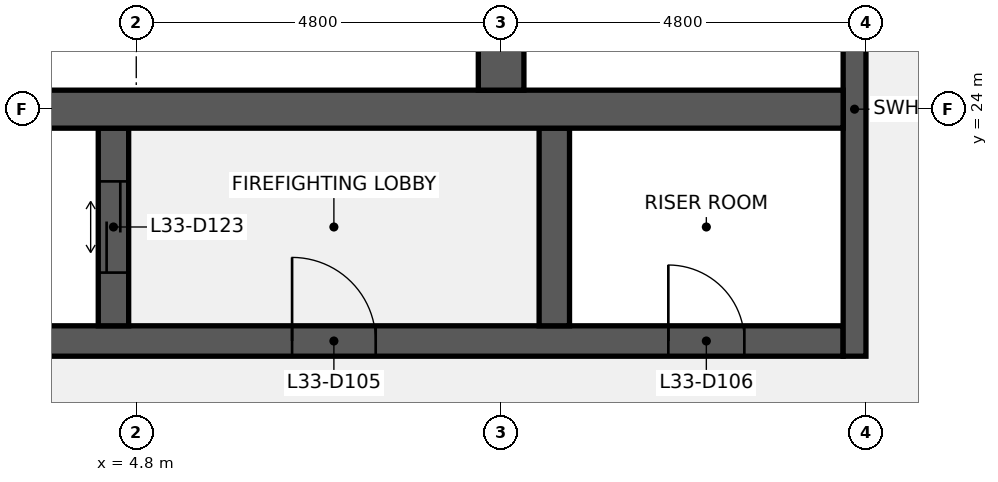
"""IFC4 building model, lengths in metres.
Left out: names, types, materials, properties, quantities, classifications, styles, units other than length and angle.
Written with IfcOpenShell. Run it as: python <this file> out.ifc"""

import sys

from ifc_helpers import new_model, si_unit, direction, frame, frame_2d, origin, place, context, subcontext, project, spatial, rectangle, extrude, element, fill, save


model = new_model("IFC4")
c1 = context("Model", 3, precision=1e-05, world=origin(), true_north=direction((0.0, 1.0)))
c2 = subcontext(c1, "Body", "Model", "MODEL_VIEW")
j1 = project(units=[si_unit("LENGTHUNIT", "METRE"), si_unit("PLANEANGLEUNIT", "RADIAN")], contexts=[c1])
p1 = place(None, origin())
s1 = spatial("IfcSite", under=j1, at=p1, CompositionType="ELEMENT")
p2 = place(p1, origin())
s2 = spatial("IfcBuilding", under=s1, at=p2, CompositionType="ELEMENT")
p3 = place(p2, frame((0.0, 0.0, 152.1)))
s3 = spatial("IfcBuildingStorey", under=s2, at=p3, CompositionType="ELEMENT", Elevation=152.1)
p4 = place(p3, frame((1.0, 20.95, 0.0), z_axis=(0.0, 0.0, 1.0), x_axis=(1.0, 0.0, 0.0)))
e1 = element("IfcWall", 1, at=p4, inside=s3, PredefinedType="SHEAR", context=c2, shape_type="SweptSolid", body=[
    extrude(rectangle(XDim=13.1, YDim=0.4, at=frame_2d((6.55, 0.0))), origin(), (0.0, 0.0, 1.0), 3.84),
])
p5 = place(p4, frame((5.85, 0.0, 0.0)))
e2 = element("IfcOpeningElement", 2, at=p5, cuts=e1, PredefinedType="OPENING", context=c2, shape_type="SweptSolid", body=[
    extrude(rectangle(XDim=1.1, YDim=2.1, at=frame_2d((0.55, 1.05))), frame((0.0, 0.21, 0.0), z_axis=(0.0, -1.0, 0.0), x_axis=(1.0, 0.0, 0.0)), (0.0, 0.0, 1.0), 0.42),
])
p6 = place(p4, frame((10.8, 0.0, 0.0)))
e3 = element("IfcOpeningElement", 3, at=p6, cuts=e1, PredefinedType="OPENING", context=c2, shape_type="SweptSolid", body=[
    extrude(rectangle(XDim=1.0, YDim=2.1, at=frame_2d((0.5, 1.05))), frame((0.0, 0.21, 0.0), z_axis=(0.0, -1.0, 0.0), x_axis=(1.0, 0.0, 0.0)), (0.0, 0.0, 1.0), 0.42),
])
p7 = place(p3, frame((14.25, 20.75, 0.0), z_axis=(0.0, 0.0, 1.0), x_axis=(0.0, 1.0, 0.0)))
e4 = element("IfcWall", 4, at=p7, inside=s3, PredefinedType="SHEAR", context=c2, shape_type="SweptSolid", body=[
    extrude(rectangle(XDim=6.5, YDim=0.3, at=frame_2d((3.25, 0.0))), origin(), (0.0, 0.0, 1.0), 3.84),
])
p8 = place(p3, frame((4.5, 21.15, 0.0), z_axis=(0.0, 0.0, 1.0), x_axis=(0.0, 1.0, 0.0)))
e5 = element("IfcWall", 5, at=p8, inside=s3, PredefinedType="SHEAR", context=c2, shape_type="SweptSolid", body=[
    extrude(rectangle(XDim=2.6, YDim=0.4, at=frame_2d((1.3, 0.0))), origin(), (0.0, 0.0, 1.0), 3.84),
])
p9 = place(p8, frame((0.7, 0.0, 0.0)))
e6 = element("IfcOpeningElement", 6, at=p9, cuts=e5, PredefinedType="OPENING", context=c2, shape_type="SweptSolid", body=[
    extrude(rectangle(XDim=1.2, YDim=2.1, at=frame_2d((0.6, 1.05))), frame((0.0, 0.21, 0.0), z_axis=(0.0, -1.0, 0.0), x_axis=(1.0, 0.0, 0.0)), (0.0, 0.0, 1.0), 0.42),
])
p10 = place(p3, frame((10.3, 21.15, 0.0), z_axis=(0.0, 0.0, 1.0), x_axis=(0.0, 1.0, 0.0)))
e7 = element("IfcWall", 7, at=p10, inside=s3, PredefinedType="SHEAR", context=c2, shape_type="SweptSolid", body=[
    extrude(rectangle(XDim=2.6, YDim=0.4, at=frame_2d((1.3, 0.0))), origin(), (0.0, 0.0, 1.0), 3.84),
])
p11 = place(p3, frame((1.0, 24.0, 0.0), z_axis=(0.0, 0.0, 1.0), x_axis=(1.0, 0.0, 0.0)))
e8 = element("IfcWall", 8, at=p11, inside=s3, PredefinedType="SHEAR", context=c2, shape_type="SweptSolid", body=[
    extrude(rectangle(XDim=13.1, YDim=0.5, at=frame_2d((6.55, 0.0))), origin(), (0.0, 0.0, 1.0), 3.84),
])
p12 = place(p3, frame((9.6, 24.25, 0.0), z_axis=(0.0, 0.0, 1.0), x_axis=(0.0, 1.0, 0.0)))
e9 = element("IfcWall", 9, at=p12, inside=s3, PredefinedType="SHEAR", context=c2, shape_type="SweptSolid", body=[
    extrude(rectangle(XDim=2.6, YDim=0.6, at=frame_2d((1.3, 0.0))), origin(), (0.0, 0.0, 1.0), 3.84),
])
p13 = place(p5, origin())
e10 = element("IfcDoor", 10, at=p13, inside=s3, OperationType="SINGLE_SWING_LEFT", PredefinedType="DOOR", context=c2, shape_type="SweptSolid", body=[
    extrude(rectangle(XDim=1.1, YDim=2.1, at=frame_2d((0.55, 1.05))), frame((0.0, 0.025, 0.0), z_axis=(0.0, -1.0, 0.0), x_axis=(1.0, 0.0, 0.0)), (0.0, 0.0, 1.0), 0.05),
])
fill(e2, e10)
p14 = place(p6, origin())
e11 = element("IfcDoor", 11, at=p14, inside=s3, OperationType="SINGLE_SWING_LEFT", PredefinedType="DOOR", context=c2, shape_type="SweptSolid", body=[
    extrude(rectangle(XDim=1.0, YDim=2.1, at=frame_2d((0.5, 1.05))), frame((0.0, 0.025, 0.0), z_axis=(0.0, -1.0, 0.0), x_axis=(1.0, 0.0, 0.0)), (0.0, 0.0, 1.0), 0.05),
])
fill(e3, e11)
p15 = place(p9, origin())
e12 = element("IfcDoor", 12, at=p15, inside=s3, OperationType="DOUBLE_DOOR_SLIDING", PredefinedType="DOOR", context=c2, shape_type="SweptSolid", body=[
    extrude(rectangle(XDim=1.2, YDim=2.1, at=frame_2d((0.6, 1.05))), frame((0.0, 0.025, 0.0), z_axis=(0.0, -1.0, 0.0), x_axis=(1.0, 0.0, 0.0)), (0.0, 0.0, 1.0), 0.05),
])
fill(e6, e12)
save(model, sys.argv[1])
